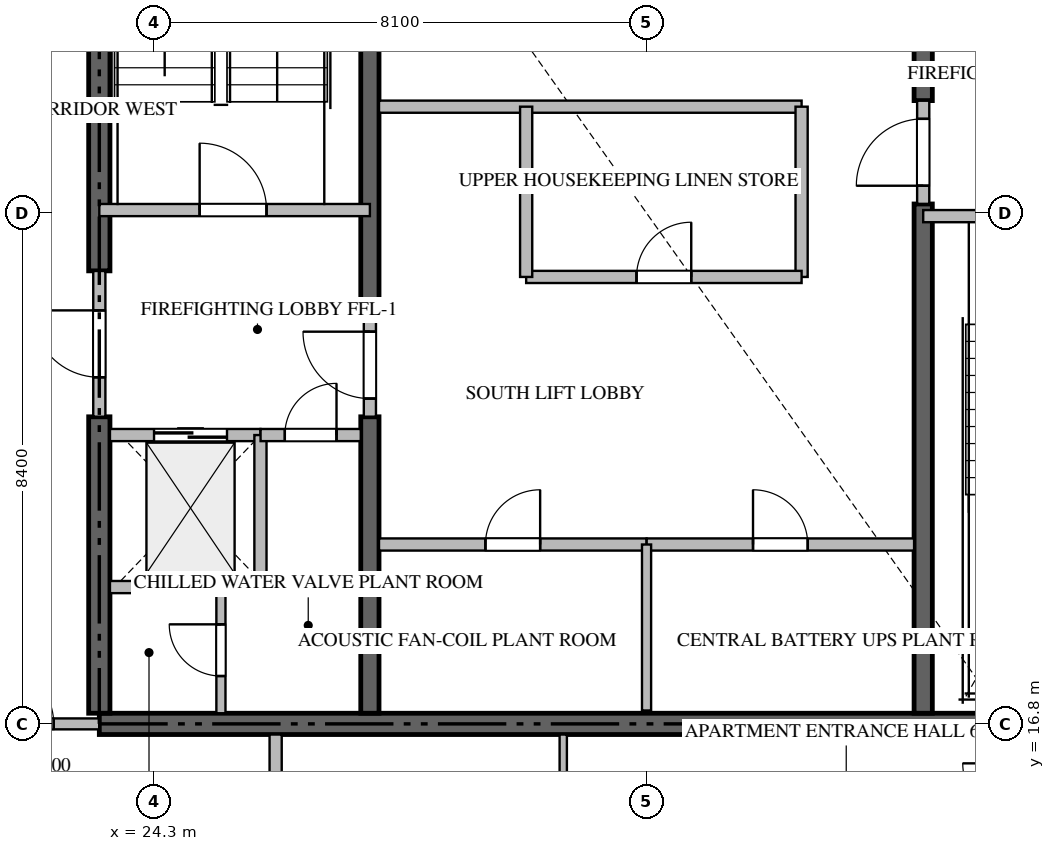
"""IFC4 building model, lengths in metres.
Left out: names, types, materials, properties, quantities, classifications, styles, units other than length and angle.
Written with IfcOpenShell. Run it as: python <this file> out.ifc"""

import sys

from ifc_helpers import new_model, si_unit, direction, frame, frame_2d, origin, place, context, subcontext, project, spatial, rectangle, extrude, source, transform, mapped, element, fill, save


model = new_model("IFC4")
c1 = context("Model", 3, precision=1e-05, world=origin(), true_north=direction((0.0, 1.0)))
c2 = subcontext(c1, "Body", "Model", "MODEL_VIEW")
j1 = project(units=[si_unit("LENGTHUNIT", "METRE"), si_unit("PLANEANGLEUNIT", "RADIAN")], contexts=[c1])
p1 = place(None, origin())
s1 = spatial("IfcSite", under=j1, at=p1, CompositionType="ELEMENT")
p2 = place(p1, origin())
s2 = spatial("IfcBuilding", under=s1, at=p2, CompositionType="ELEMENT")
p3 = place(p2, frame((0.0, 0.0, 275.9)))
s3 = spatial("IfcBuildingStorey", under=s2, at=p3, CompositionType="ELEMENT", Elevation=275.9)
p4 = place(p3, frame((23.4, 16.8, -0.26), z_axis=(0.0, 0.0, 1.0), x_axis=(1.0, 0.0, 0.0)))
e1 = element("IfcWall", 1, at=p4, inside=s3, PredefinedType="SHEAR", context=c2, shape_type="SweptSolid", body=[
    extrude(rectangle(XDim=18.0, YDim=0.35, at=frame_2d((9.0, 0.0))), origin(), (0.0, 0.0, 1.0), 3.848),
])
p5 = place(p3, frame((23.4, 16.975, -0.26), z_axis=(0.0, 0.0, 1.0), x_axis=(0.0, 1.0, 0.0)))
e2 = element("IfcWall", 2, at=p5, inside=s3, PredefinedType="SHEAR", context=c2, shape_type="SweptSolid", body=[
    extrude(rectangle(XDim=4.875, YDim=0.35, at=frame_2d((2.438, 0.0))), origin(), (0.0, 0.0, 1.0), 3.848),
])
p6 = place(p3, frame((23.4, 24.25, -0.26), z_axis=(0.0, 0.0, 1.0), x_axis=(0.0, 1.0, 0.0)))
e3 = element("IfcWall", 3, at=p6, inside=s3, PredefinedType="SHEAR", context=c2, shape_type="SweptSolid", body=[
    extrude(rectangle(XDim=9.175, YDim=0.35, at=frame_2d((4.587, 0.0))), origin(), (0.0, 0.0, 1.0), 3.848),
])
p7 = place(p3, frame((27.85, 16.975, -0.26), z_axis=(0.0, 0.0, 1.0), x_axis=(0.0, 1.0, 0.0)))
e4 = element("IfcWall", 4, at=p7, inside=s3, PredefinedType="SHEAR", context=c2, shape_type="SweptSolid", body=[
    extrude(rectangle(XDim=4.875, YDim=0.3, at=frame_2d((2.438, 0.0))), origin(), (0.0, 0.0, 1.0), 3.848),
])
p8 = place(p3, frame((27.85, 23.55, -0.26), z_axis=(0.0, 0.0, 1.0), x_axis=(0.0, 1.0, 0.0)))
e5 = element("IfcWall", 5, at=p8, inside=s3, PredefinedType="SHEAR", context=c2, shape_type="SweptSolid", body=[
    extrude(rectangle(XDim=9.875, YDim=0.3, at=frame_2d((4.938, 0.0))), origin(), (0.0, 0.0, 1.0), 3.848),
])
p9 = place(p3, frame((36.95, 16.975, -0.26), z_axis=(0.0, 0.0, 1.0), x_axis=(0.0, 1.0, 0.0)))
e6 = element("IfcWall", 6, at=p9, inside=s3, PredefinedType="SHEAR", context=c2, shape_type="SweptSolid", body=[
    extrude(rectangle(XDim=8.375, YDim=0.3, at=frame_2d((4.188, 0.0))), origin(), (0.0, 0.0, 1.0), 3.848),
])
p10 = place(p3, frame((36.95, 27.05, -0.26), z_axis=(0.0, 0.0, 1.0), x_axis=(0.0, 1.0, 0.0)))
e7 = element("IfcWall", 7, at=p10, inside=s3, PredefinedType="SHEAR", context=c2, shape_type="SweptSolid", body=[
    extrude(rectangle(XDim=6.375, YDim=0.3, at=frame_2d((3.188, 0.0))), origin(), (0.0, 0.0, 1.0), 3.848),
])
p11 = place(p3, frame((23.4, 25.25, 0.0), z_axis=(0.0, 0.0, 1.0), x_axis=(1.0, 0.0, 0.0)))
e8 = element("IfcWall", 8, at=p11, inside=s3, PredefinedType="STANDARD", context=c2, shape_type="SweptSolid", body=[
    extrude(rectangle(XDim=4.45, YDim=0.2, at=frame_2d((2.225, 0.0))), origin(), (0.0, 0.0, 1.0), 3.59),
])
p12 = place(p11, frame((1.65, 0.0, 0.0)))
e9 = element("IfcOpeningElement", 9, at=p12, cuts=e8, PredefinedType="OPENING", context=c2, shape_type="SweptSolid", body=[
    extrude(rectangle(XDim=1.1, YDim=2.15, at=frame_2d((0.55, 1.075))), frame((0.0, 0.11, 0.0), z_axis=(0.0, -1.0, 0.0), x_axis=(1.0, 0.0, 0.0)), (0.0, 0.0, 1.0), 0.22),
])
p13 = place(p3, frame((36.95, 25.15, 0.0), z_axis=(0.0, 0.0, 1.0), x_axis=(1.0, 0.0, 0.0)))
e10 = element("IfcWall", 10, at=p13, inside=s3, PredefinedType="STANDARD", context=c2, shape_type="SweptSolid", body=[
    extrude(rectangle(XDim=4.45, YDim=0.2, at=frame_2d((2.225, 0.0))), origin(), (0.0, 0.0, 1.0), 3.59),
])
p14 = place(p13, frame((1.65, 0.0, 0.0)))
e11 = element("IfcOpeningElement", 11, at=p14, cuts=e10, PredefinedType="OPENING", context=c2, shape_type="SweptSolid", body=[
    extrude(rectangle(XDim=1.1, YDim=2.15, at=frame_2d((0.55, 1.075))), frame((0.0, 0.11, 0.0), z_axis=(0.0, -1.0, 0.0), x_axis=(1.0, 0.0, 0.0)), (0.0, 0.0, 1.0), 0.22),
])
p15 = place(p3, frame((23.575, 21.55, 0.0), z_axis=(0.0, 0.0, 1.0), x_axis=(1.0, 0.0, 0.0)))
e12 = element("IfcWall", 12, at=p15, inside=s3, PredefinedType="STANDARD", context=c2, shape_type="SweptSolid", body=[
    extrude(rectangle(XDim=2.475, YDim=0.2, at=frame_2d((1.238, 0.0))), origin(), (0.0, 0.0, 1.0), 3.59),
])
p16 = place(p15, frame((0.725, 0.0, 0.0)))
e13 = element("IfcOpeningElement", 13, at=p16, cuts=e12, PredefinedType="OPENING", context=c2, shape_type="SweptSolid", body=[
    extrude(rectangle(XDim=1.2, YDim=2.2, at=frame_2d((0.6, 1.1))), frame((0.0, 0.11, 0.0), z_axis=(0.0, -1.0, 0.0), x_axis=(1.0, 0.0, 0.0)), (0.0, 0.0, 1.0), 0.22),
])
p17 = place(p3, frame((26.05, 19.05, 0.0), z_axis=(0.0, 0.0, 1.0), x_axis=(0.0, 1.0, 0.0)))
e14 = element("IfcWall", 14, at=p17, inside=s3, PredefinedType="STANDARD", context=c2, shape_type="SweptSolid", body=[
    extrude(rectangle(XDim=2.5, YDim=0.2, at=frame_2d((1.25, 0.0))), origin(), (0.0, 0.0, 1.0), 3.59),
])
p18 = place(p3, frame((23.575, 19.05, 0.0), z_axis=(0.0, 0.0, 1.0), x_axis=(1.0, 0.0, 0.0)))
e15 = element("IfcWall", 15, at=p18, inside=s3, PredefinedType="STANDARD", context=c2, shape_type="SweptSolid", body=[
    extrude(rectangle(XDim=2.475, YDim=0.2, at=frame_2d((1.238, 0.0))), origin(), (0.0, 0.0, 1.0), 3.59),
])
p19 = place(p3, frame((26.052, 21.55, 0.0), z_axis=(0.0, 0.0, 1.0), x_axis=(1.0, 0.0, 0.0)))
e16 = element("IfcWall", 16, at=p19, inside=s3, PredefinedType="STANDARD", context=c2, shape_type="SweptSolid", body=[
    extrude(rectangle(XDim=1.648, YDim=0.2, at=frame_2d((0.824, 0.0))), origin(), (0.0, 0.0, 1.0), 3.59),
])
p20 = place(p19, frame((0.399, 0.0, 0.0)))
e17 = element("IfcOpeningElement", 17, at=p20, cuts=e16, PredefinedType="OPENING", context=c2, shape_type="SweptSolid", body=[
    extrude(rectangle(XDim=0.85, YDim=2.1, at=frame_2d((0.425, 1.05))), frame((0.0, 0.11, 0.0), z_axis=(0.0, -1.0, 0.0), x_axis=(1.0, 0.0, 0.0)), (0.0, 0.0, 1.0), 0.22),
])
p21 = place(p3, frame((23.4, 21.852, 0.0), z_axis=(0.0, 0.0, 1.0), x_axis=(0.0, 1.0, 0.0)))
e18 = element("IfcWall", 18, at=p21, inside=s3, PredefinedType="STANDARD", context=c2, shape_type="SweptSolid", body=[
    extrude(rectangle(XDim=2.396, YDim=0.2, at=frame_2d((1.198, 0.0))), origin(), (0.0, 0.0, 1.0), 3.59),
])
p22 = place(p21, frame((0.648, 0.0, 0.0)))
e19 = element("IfcOpeningElement", 19, at=p22, cuts=e18, PredefinedType="OPENING", context=c2, shape_type="SweptSolid", body=[
    extrude(rectangle(XDim=1.1, YDim=2.15, at=frame_2d((0.55, 1.075))), frame((0.0, 0.11, 0.0), z_axis=(0.0, -1.0, 0.0), x_axis=(1.0, 0.0, 0.0)), (0.0, 0.0, 1.0), 0.22),
])
p23 = place(p3, frame((27.85, 21.852, 0.0), z_axis=(0.0, 0.0, 1.0), x_axis=(0.0, 1.0, 0.0)))
e20 = element("IfcWall", 20, at=p23, inside=s3, PredefinedType="STANDARD", context=c2, shape_type="SweptSolid", body=[
    extrude(rectangle(XDim=1.696, YDim=0.2, at=frame_2d((0.848, 0.0))), origin(), (0.0, 0.0, 1.0), 3.59),
])
p24 = place(p23, frame((0.298, 0.0, 0.0)))
e21 = element("IfcOpeningElement", 21, at=p24, cuts=e20, PredefinedType="OPENING", context=c2, shape_type="SweptSolid", body=[
    extrude(rectangle(XDim=1.1, YDim=2.15, at=frame_2d((0.55, 1.075))), frame((0.0, 0.11, 0.0), z_axis=(0.0, -1.0, 0.0), x_axis=(1.0, 0.0, 0.0)), (0.0, 0.0, 1.0), 0.22),
])
p25 = place(p3, frame((36.95, 25.352, 0.0), z_axis=(0.0, 0.0, 1.0), x_axis=(0.0, 1.0, 0.0)))
e22 = element("IfcWall", 22, at=p25, inside=s3, PredefinedType="STANDARD", context=c2, shape_type="SweptSolid", body=[
    extrude(rectangle(XDim=1.696, YDim=0.2, at=frame_2d((0.848, 0.0))), origin(), (0.0, 0.0, 1.0), 3.59),
])
p26 = place(p25, frame((0.298, 0.0, 0.0)))
e23 = element("IfcOpeningElement", 23, at=p26, cuts=e22, PredefinedType="OPENING", context=c2, shape_type="SweptSolid", body=[
    extrude(rectangle(XDim=1.1, YDim=2.15, at=frame_2d((0.55, 1.075))), frame((0.0, 0.11, 0.0), z_axis=(0.0, -1.0, 0.0), x_axis=(1.0, 0.0, 0.0)), (0.0, 0.0, 1.0), 0.22),
])
p27 = place(p3, frame((25.4, 16.975, 0.0), z_axis=(0.0, 0.0, 1.0), x_axis=(0.0, 1.0, 0.0)))
e24 = element("IfcWall", 24, at=p27, inside=s3, PredefinedType="PARTITIONING", context=c2, shape_type="SweptSolid", body=[
    extrude(rectangle(XDim=2.075, YDim=0.15, at=frame_2d((1.038, 0.0))), origin(), (0.0, 0.0, 1.0), 3.59),
])
p28 = place(p27, frame((0.612, 0.0, 0.0)))
e25 = element("IfcOpeningElement", 25, at=p28, cuts=e24, PredefinedType="OPENING", context=c2, shape_type="SweptSolid", body=[
    extrude(rectangle(XDim=0.85, YDim=2.1, at=frame_2d((0.425, 1.05))), frame((0.0, 0.085, 0.0), z_axis=(0.0, -1.0, 0.0), x_axis=(1.0, 0.0, 0.0)), (0.0, 0.0, 1.0), 0.17),
])
p29 = place(p3, frame((28.0, 19.75, 0.0), z_axis=(0.0, 0.0, 1.0), x_axis=(1.0, 0.0, 0.0)))
e26 = element("IfcWall", 26, at=p29, inside=s3, PredefinedType="STANDARD", context=c2, shape_type="SweptSolid", body=[
    extrude(rectangle(XDim=4.4, YDim=0.2, at=frame_2d((2.2, 0.0))), origin(), (0.0, 0.0, 1.0), 3.59),
])
p30 = place(p29, frame((1.75, 0.0, 0.0)))
e27 = element("IfcOpeningElement", 27, at=p30, cuts=e26, PredefinedType="OPENING", context=c2, shape_type="SweptSolid", body=[
    extrude(rectangle(XDim=0.9, YDim=2.1, at=frame_2d((0.45, 1.05))), frame((0.0, 0.11, 0.0), z_axis=(0.0, -1.0, 0.0), x_axis=(1.0, 0.0, 0.0)), (0.0, 0.0, 1.0), 0.22),
])
p31 = place(p3, frame((32.402, 19.75, 0.0), z_axis=(0.0, 0.0, 1.0), x_axis=(1.0, 0.0, 0.0)))
e28 = element("IfcWall", 28, at=p31, inside=s3, PredefinedType="STANDARD", context=c2, shape_type="SweptSolid", body=[
    extrude(rectangle(XDim=4.398, YDim=0.2, at=frame_2d((2.199, 0.0))), origin(), (0.0, 0.0, 1.0), 3.59),
])
p32 = place(p31, frame((1.749, 0.0, 0.0)))
e29 = element("IfcOpeningElement", 29, at=p32, cuts=e28, PredefinedType="OPENING", context=c2, shape_type="SweptSolid", body=[
    extrude(rectangle(XDim=0.9, YDim=2.1, at=frame_2d((0.45, 1.05))), frame((0.0, 0.11, 0.0), z_axis=(0.0, -1.0, 0.0), x_axis=(1.0, 0.0, 0.0)), (0.0, 0.0, 1.0), 0.22),
])
p33 = place(p3, frame((32.4, 17.02, 0.0), z_axis=(0.0, 0.0, 1.0), x_axis=(0.0, 1.0, 0.0)))
e30 = element("IfcWall", 30, at=p33, inside=s3, PredefinedType="PARTITIONING", context=c2, shape_type="SweptSolid", body=[
    extrude(rectangle(XDim=2.73, YDim=0.15, at=frame_2d((1.365, 0.0))), origin(), (0.0, 0.0, 1.0), 3.59),
])
p34 = place(p3, frame((28.0, 26.95, 0.0), z_axis=(0.0, 0.0, 1.0), x_axis=(1.0, 0.0, 0.0)))
e31 = element("IfcWall", 31, at=p34, inside=s3, PredefinedType="STANDARD", context=c2, shape_type="SweptSolid", body=[
    extrude(rectangle(XDim=6.95, YDim=0.2, at=frame_2d((3.475, 0.0))), origin(), (0.0, 0.0, 1.0), 3.59),
])
p35 = place(p3, frame((34.95, 24.15, 0.0), z_axis=(0.0, 0.0, 1.0), x_axis=(0.0, 1.0, 0.0)))
e32 = element("IfcWall", 32, at=p35, inside=s3, PredefinedType="STANDARD", context=c2, shape_type="SweptSolid", body=[
    extrude(rectangle(XDim=2.8, YDim=0.2, at=frame_2d((1.4, 0.0))), origin(), (0.0, 0.0, 1.0), 3.59),
])
p36 = place(p3, frame((30.42, 24.15, 0.0), z_axis=(0.0, 0.0, 1.0), x_axis=(1.0, 0.0, 0.0)))
e33 = element("IfcWall", 33, at=p36, inside=s3, PredefinedType="STANDARD", context=c2, shape_type="SweptSolid", body=[
    extrude(rectangle(XDim=4.53, YDim=0.2, at=frame_2d((2.265, 0.0))), origin(), (0.0, 0.0, 1.0), 3.59),
])
p37 = place(p36, frame((1.815, 0.0, 0.0)))
e34 = element("IfcOpeningElement", 34, at=p37, cuts=e33, PredefinedType="OPENING", context=c2, shape_type="SweptSolid", body=[
    extrude(rectangle(XDim=0.9, YDim=2.1, at=frame_2d((0.45, 1.05))), frame((0.0, 0.11, 0.0), z_axis=(0.0, -1.0, 0.0), x_axis=(1.0, 0.0, 0.0)), (0.0, 0.0, 1.0), 0.22),
])
p38 = place(p3, frame((30.42, 24.15, 0.0), z_axis=(0.0, 0.0, 1.0), x_axis=(0.0, 1.0, 0.0)))
e35 = element("IfcWall", 35, at=p38, inside=s3, PredefinedType="STANDARD", context=c2, shape_type="SweptSolid", body=[
    extrude(rectangle(XDim=2.8, YDim=0.2, at=frame_2d((1.4, 0.0))), origin(), (0.0, 0.0, 1.0), 3.59),
])
p39 = place(p3, frame((26.3, 1.282, 0.0), z_axis=(0.0, 0.0, 1.0), x_axis=(0.0, 1.0, 0.0)))
e36 = element("IfcWall", 36, at=p39, inside=s3, PredefinedType="PARTITIONING", context=c2, shape_type="SweptSolid", body=[
    extrude(rectangle(XDim=15.343, YDim=0.2, at=frame_2d((7.671, 0.0))), origin(), (0.0, 0.0, 1.0), 3.59),
])
p40 = place(p3, frame((20.902, 16.8, 0.0), z_axis=(0.0, 0.0, 1.0), x_axis=(1.0, 0.0, 0.0)))
e37 = element("IfcWall", 37, at=p40, inside=s3, PredefinedType="PARTITIONING", context=c2, shape_type="SweptSolid", body=[
    extrude(rectangle(XDim=2.496, YDim=0.18, at=frame_2d((1.248, 0.0))), origin(), (0.0, 0.0, 1.0), 3.59),
])
p41 = place(p40, frame((0.748, 0.0, 0.0)))
e38 = element("IfcOpeningElement", 38, at=p41, cuts=e37, PredefinedType="OPENING", context=c2, shape_type="SweptSolid", body=[
    extrude(rectangle(XDim=1.0, YDim=2.15, at=frame_2d((0.5, 1.075))), frame((0.0, 0.1, 0.0), z_axis=(0.0, -1.0, 0.0), x_axis=(1.0, 0.0, 0.0)), (0.0, 0.0, 1.0), 0.2),
])
p42 = place(p3, frame((31.03, 14.652, 0.0), z_axis=(0.0, 0.0, 1.0), x_axis=(0.0, 1.0, 0.0)))
e39 = element("IfcWall", 39, at=p42, inside=s3, PredefinedType="PARTITIONING", context=c2, shape_type="SweptSolid", body=[
    extrude(rectangle(XDim=1.973, YDim=0.12, at=frame_2d((0.986, 0.0))), origin(), (0.0, 0.0, 1.0), 3.59),
])
m1 = source(origin(), c2, "Body", "SweptSolid", [
    extrude(rectangle(XDim=1.1, YDim=2.15, at=frame_2d((0.55, 1.075))), frame((0.0, 0.025, 0.0), z_axis=(0.0, -1.0, 0.0), x_axis=(1.0, 0.0, 0.0)), (0.0, 0.0, 1.0), 0.05),
])
p43 = place(p12, origin())
e40 = element("IfcDoor", 40, at=p43, inside=s3, OperationType="SINGLE_SWING_LEFT", PredefinedType="DOOR", context=c2, shape_type="MappedRepresentation", body=[
    mapped(m1, transform((0.0, 0.0, 0.0), scale=1.0)),
])
fill(e9, e40)
m2 = source(origin(), c2, "Body", "SweptSolid", [
    extrude(rectangle(XDim=1.2, YDim=2.2, at=frame_2d((0.6, 1.1))), frame((0.0, 0.025, 0.0), z_axis=(0.0, -1.0, 0.0), x_axis=(1.0, 0.0, 0.0)), (0.0, 0.0, 1.0), 0.05),
])
p44 = place(p16, origin())
e41 = element("IfcDoor", 41, at=p44, inside=s3, OperationType="DOUBLE_DOOR_SLIDING", PredefinedType="DOOR", context=c2, shape_type="MappedRepresentation", body=[
    mapped(m2, transform((0.0, 0.0, 0.0), scale=1.0)),
])
fill(e13, e41)
m3 = source(origin(), c2, "Body", "SweptSolid", [
    extrude(rectangle(XDim=0.85, YDim=2.1, at=frame_2d((0.425, 1.05))), frame((0.0, 0.025, 0.0), z_axis=(0.0, -1.0, 0.0), x_axis=(1.0, 0.0, 0.0)), (0.0, 0.0, 1.0), 0.05),
])
p45 = place(p20, origin())
e42 = element("IfcDoor", 42, at=p45, inside=s3, OperationType="SINGLE_SWING_RIGHT", PredefinedType="DOOR", context=c2, shape_type="MappedRepresentation", body=[
    mapped(m3, transform((0.0, 0.0, 0.0), scale=1.0)),
])
fill(e17, e42)
p46 = place(p22, origin())
e43 = element("IfcDoor", 43, at=p46, inside=s3, OperationType="SINGLE_SWING_RIGHT", PredefinedType="DOOR", context=c2, shape_type="MappedRepresentation", body=[
    mapped(m1, transform((0.0, 0.0, 0.0), scale=1.0)),
])
fill(e19, e43)
p47 = place(p24, origin())
e44 = element("IfcDoor", 44, at=p47, inside=s3, OperationType="SINGLE_SWING_RIGHT", PredefinedType="DOOR", context=c2, shape_type="MappedRepresentation", body=[
    mapped(m1, transform((0.0, 0.0, 0.0), scale=1.0)),
])
fill(e21, e44)
p48 = place(p26, origin())
e45 = element("IfcDoor", 45, at=p48, inside=s3, OperationType="SINGLE_SWING_LEFT", PredefinedType="DOOR", context=c2, shape_type="MappedRepresentation", body=[
    mapped(m1, transform((0.0, 0.0, 0.0), scale=1.0)),
])
fill(e23, e45)
p49 = place(p28, origin())
e46 = element("IfcDoor", 46, at=p49, inside=s3, OperationType="SINGLE_SWING_RIGHT", PredefinedType="DOOR", context=c2, shape_type="MappedRepresentation", body=[
    mapped(m3, transform((0.0, 0.0, 0.0), scale=1.0)),
])
fill(e25, e46)
m4 = source(origin(), c2, "Body", "SweptSolid", [
    extrude(rectangle(XDim=0.9, YDim=2.1, at=frame_2d((0.45, 1.05))), frame((0.0, 0.025, 0.0), z_axis=(0.0, -1.0, 0.0), x_axis=(1.0, 0.0, 0.0)), (0.0, 0.0, 1.0), 0.05),
])
p50 = place(p30, origin())
e47 = element("IfcDoor", 47, at=p50, inside=s3, OperationType="SINGLE_SWING_RIGHT", PredefinedType="DOOR", context=c2, shape_type="MappedRepresentation", body=[
    mapped(m4, transform((0.0, 0.0, 0.0), scale=1.0)),
])
fill(e27, e47)
p51 = place(p32, origin())
e48 = element("IfcDoor", 48, at=p51, inside=s3, OperationType="SINGLE_SWING_LEFT", PredefinedType="DOOR", context=c2, shape_type="MappedRepresentation", body=[
    mapped(m4, transform((0.0, 0.0, 0.0), scale=1.0)),
])
fill(e29, e48)
p52 = place(p37, origin())
e49 = element("IfcDoor", 49, at=p52, inside=s3, OperationType="SINGLE_SWING_RIGHT", PredefinedType="DOOR", context=c2, shape_type="MappedRepresentation", body=[
    mapped(m4, transform((0.0, 0.0, 0.0), scale=1.0)),
])
fill(e34, e49)
m5 = source(origin(), c2, "Body", "SweptSolid", [
    extrude(rectangle(XDim=1.0, YDim=2.15, at=frame_2d((0.5, 1.075))), frame((0.0, 0.025, 0.0), z_axis=(0.0, -1.0, 0.0), x_axis=(1.0, 0.0, 0.0)), (0.0, 0.0, 1.0), 0.05),
])
p53 = place(p41, origin())
e50 = element("IfcDoor", 50, at=p53, inside=s3, OperationType="SINGLE_SWING_LEFT", PredefinedType="DOOR", context=c2, shape_type="MappedRepresentation", body=[
    mapped(m5, transform((0.0, 0.0, 0.0), scale=1.0)),
])
fill(e38, e50)
save(model, sys.argv[1])
